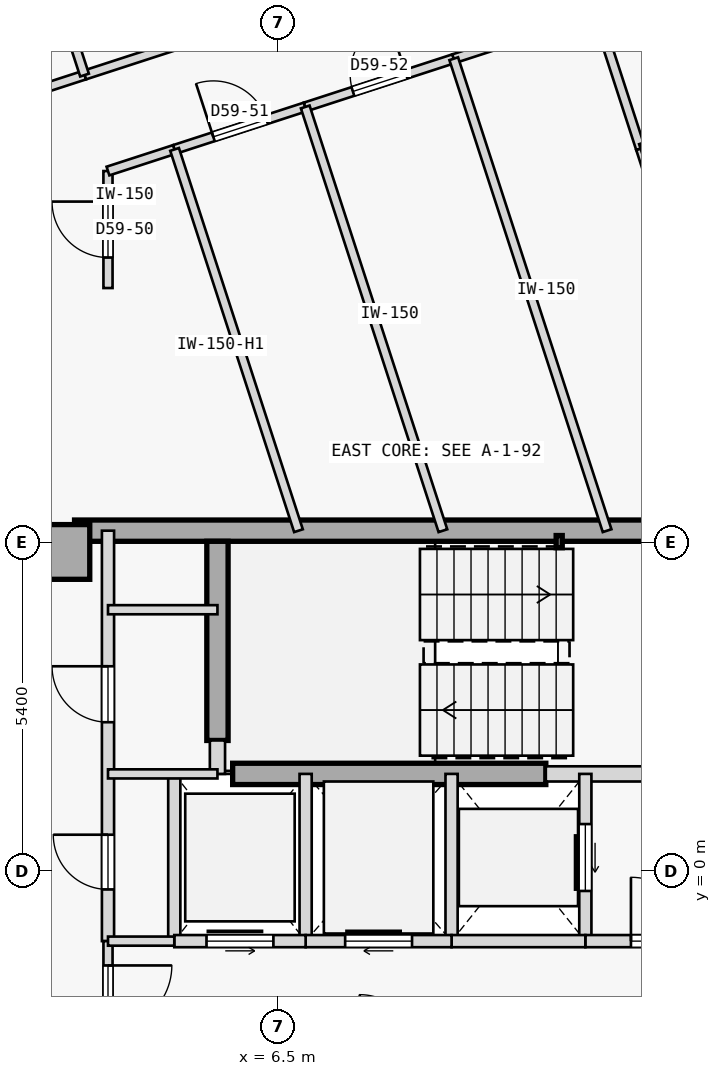
"""IFC4 building model, lengths in metres.
Left out: names, types, materials, properties, quantities, classifications, styles, units other than length and angle.
Written with IfcOpenShell. Run it as: python <this file> out.ifc"""

import sys

from ifc_helpers import new_model, si_unit, direction, frame, frame_2d, origin, origin_2d, place, context, subcontext, project, spatial, rectangle, hollow_rectangle, extrude, element, fill, save


model = new_model("IFC4")
c1 = context("Model", 3, precision=1e-05, world=origin(), true_north=direction((0.0, 1.0)))
c2 = subcontext(c1, "Body", "Model", "MODEL_VIEW")
j1 = project(units=[si_unit("LENGTHUNIT", "METRE"), si_unit("PLANEANGLEUNIT", "RADIAN")], contexts=[c1])
p1 = place(None, origin())
s1 = spatial("IfcSite", under=j1, at=p1, CompositionType="ELEMENT")
p2 = place(p1, origin())
s2 = spatial("IfcBuilding", under=s1, at=p2, CompositionType="ELEMENT")
p3 = place(p2, frame((0.0, 0.0, 224.3)))
s3 = spatial("IfcBuildingStorey", under=s2, at=p3, CompositionType="ELEMENT", Elevation=224.3)
p4 = place(p3, frame((2.95, 5.25, 0.0), z_axis=(0.0, 0.0, 1.0), x_axis=(1.0, 0.0, 0.0)))
e1 = element("IfcColumn", 1, at=p4, inside=s3, PredefinedType="COLUMN", context=c2, shape_type="SweptSolid", body=[
    extrude(rectangle(XDim=0.9, YDim=0.9, at=origin_2d()), origin(), (0.0, 0.0, 1.0), 3.35),
])
p5 = place(p3, frame((3.15, 5.6, 0.0), z_axis=(0.0, 0.0, 1.0), x_axis=(1.0, 0.0, 0.0)))
e2 = element("IfcWall", 2, at=p5, inside=s3, PredefinedType="SHEAR", context=c2, shape_type="SweptSolid", body=[
    extrude(rectangle(XDim=11.41, YDim=0.35, at=frame_2d((5.705, 0.0))), origin(), (0.0, 0.0, 1.0), 3.125),
])
p6 = place(p3, frame((5.5, 2.15, 0.0), z_axis=(0.0, 0.0, 1.0), x_axis=(0.0, 1.0, 0.0)))
e3 = element("IfcWall", 3, at=p6, inside=s3, PredefinedType="SHEAR", context=c2, shape_type="SweptSolid", body=[
    extrude(rectangle(XDim=3.275, YDim=0.35, at=frame_2d((1.638, 0.0))), origin(), (0.0, 0.0, 1.0), 3.125),
])
p7 = place(p3, frame((5.75, 1.6, 0.0), z_axis=(0.0, 0.0, 1.0), x_axis=(1.0, 0.0, 0.0)))
e4 = element("IfcWall", 4, at=p7, inside=s3, PredefinedType="SHEAR", context=c2, shape_type="SweptSolid", body=[
    extrude(rectangle(XDim=5.15, YDim=0.35, at=frame_2d((2.575, 0.0))), origin(), (0.0, 0.0, 1.0), 3.125),
])
p8 = place(p3, frame((11.12, 5.42, 0.0), z_axis=(0.0, 0.0, 1.0), x_axis=(1.0, 0.0, 0.0)))
e5 = element("IfcColumn", 5, at=p8, inside=s3, PredefinedType="COLUMN", context=c2, shape_type="SweptSolid", body=[
    extrude(hollow_rectangle(XDim=0.1, YDim=0.2, WallThickness=0.008, at=origin_2d()), origin(), (0.0, 0.0, 1.0), 3.35),
])
p9 = place(p3, frame((10.9, 1.6, 0.0), z_axis=(0.0, 0.0, 1.0), x_axis=(1.0, 0.0, 0.0)))
e6 = element("IfcWall", 6, at=p9, inside=s3, PredefinedType="STANDARD", context=c2, shape_type="SweptSolid", body=[
    extrude(rectangle(XDim=3.6, YDim=0.25, at=frame_2d((1.8, 0.0))), origin(), (0.0, 0.0, 1.0), 3.125),
])
p10 = place(p9, frame((1.62, 0.0, 0.0)))
e7 = element("IfcOpeningElement", 7, at=p10, cuts=e6, PredefinedType="OPENING", context=c2, shape_type="SweptSolid", body=[
    extrude(rectangle(XDim=1.05, YDim=2.15, at=frame_2d((0.525, 1.075))), frame((0.0, 0.135, 0.0), z_axis=(0.0, -1.0, 0.0), x_axis=(1.0, 0.0, 0.0)), (0.0, 0.0, 1.0), 0.27),
])
p11 = place(p3, frame((5.5, 1.6, 0.0), z_axis=(0.0, 0.0, 1.0), x_axis=(0.0, 1.0, 0.0)))
e8 = element("IfcWall", 8, at=p11, inside=s3, PredefinedType="STANDARD", context=c2, shape_type="SweptSolid", body=[
    extrude(rectangle(XDim=0.55, YDim=0.25, at=frame_2d((0.275, 0.0))), origin(), (0.0, 0.0, 1.0), 3.125),
])
p12 = place(p3, frame((3.7, -1.15, 0.0), z_axis=(0.0, 0.0, 1.0), x_axis=(0.0, 1.0, 0.0)))
e9 = element("IfcWall", 9, at=p12, inside=s3, PredefinedType="STANDARD", context=c2, shape_type="SweptSolid", body=[
    extrude(rectangle(XDim=6.75, YDim=0.2, at=frame_2d((3.375, 0.0))), origin(), (0.0, 0.0, 1.0), 3.125),
])
p13 = place(p12, frame((3.6, 0.0, 0.0)))
e10 = element("IfcOpeningElement", 10, at=p13, cuts=e9, PredefinedType="OPENING", context=c2, shape_type="SweptSolid", body=[
    extrude(rectangle(XDim=0.92, YDim=2.15, at=frame_2d((0.46, 1.075))), frame((0.0, 0.11, 0.0), z_axis=(0.0, -1.0, 0.0), x_axis=(1.0, 0.0, 0.0)), (0.0, 0.0, 1.0), 0.22),
])
p14 = place(p12, frame((0.85, 0.0, 0.0)))
e11 = element("IfcOpeningElement", 11, at=p14, cuts=e9, PredefinedType="OPENING", context=c2, shape_type="SweptSolid", body=[
    extrude(rectangle(XDim=0.9, YDim=2.15, at=frame_2d((0.45, 1.075))), frame((0.0, 0.11, 0.0), z_axis=(0.0, -1.0, 0.0), x_axis=(1.0, 0.0, 0.0)), (0.0, 0.0, 1.0), 0.22),
])
p15 = place(p3, frame((3.7, -2.95, 0.0), z_axis=(0.0, 0.0, 1.0), x_axis=(0.0, 1.0, 0.0)))
e12 = element("IfcWall", 12, at=p15, inside=s3, PredefinedType="PARTITIONING", context=c2, shape_type="SweptSolid", body=[
    extrude(rectangle(XDim=1.8, YDim=0.15, at=frame_2d((0.9, 0.0))), origin(), (0.0, 0.0, 1.0), 3.125),
])
p16 = place(p15, frame((0.35, 0.0, 0.0)))
e13 = element("IfcOpeningElement", 13, at=p16, cuts=e12, PredefinedType="OPENING", context=c2, shape_type="SweptSolid", body=[
    extrude(rectangle(XDim=1.05, YDim=2.18, at=frame_2d((0.525, 1.09))), frame((0.0, 0.085, 0.0), z_axis=(0.0, -1.0, 0.0), x_axis=(1.0, 0.0, 0.0)), (0.0, 0.0, 1.0), 0.17),
])
p17 = place(p3, frame((11.55, -1.15, 0.0), z_axis=(0.0, 0.0, 1.0), x_axis=(0.0, 1.0, 0.0)))
e14 = element("IfcWall", 14, at=p17, inside=s3, PredefinedType="STANDARD", context=c2, shape_type="SweptSolid", body=[
    extrude(rectangle(XDim=2.75, YDim=0.2, at=frame_2d((1.375, 0.0))), origin(), (0.0, 0.0, 1.0), 3.125),
])
p18 = place(p17, frame((0.825, 0.0, 0.0)))
e15 = element("IfcOpeningElement", 15, at=p18, cuts=e14, PredefinedType="OPENING", context=c2, shape_type="SweptSolid", body=[
    extrude(rectangle(XDim=1.1, YDim=2.15, at=frame_2d((0.55, 1.075))), frame((0.0, 0.11, 0.0), z_axis=(0.0, -1.0, 0.0), x_axis=(1.0, 0.0, 0.0)), (0.0, 0.0, 1.0), 0.22),
])
p19 = place(p3, frame((9.35, -1.15, 0.0), z_axis=(0.0, 0.0, 1.0), x_axis=(0.0, 1.0, 0.0)))
e16 = element("IfcWall", 16, at=p19, inside=s3, PredefinedType="STANDARD", context=c2, shape_type="SweptSolid", body=[
    extrude(rectangle(XDim=2.75, YDim=0.2, at=frame_2d((1.375, 0.0))), origin(), (0.0, 0.0, 1.0), 3.125),
])
p20 = place(p3, frame((11.55, -1.15, 0.0), z_axis=(0.0, 0.0, 1.0), x_axis=(1.0, 0.0, 0.0)))
e17 = element("IfcWall", 17, at=p20, inside=s3, PredefinedType="STANDARD", context=c2, shape_type="SweptSolid", body=[
    extrude(rectangle(XDim=2.95, YDim=0.2, at=frame_2d((1.475, 0.0))), origin(), (0.0, 0.0, 1.0), 3.125),
])
p21 = place(p20, frame((0.75, 0.0, 0.0)))
e18 = element("IfcOpeningElement", 18, at=p21, cuts=e17, PredefinedType="OPENING", context=c2, shape_type="SweptSolid", body=[
    extrude(rectangle(XDim=1.05, YDim=2.18, at=frame_2d((0.525, 1.09))), frame((0.0, 0.11, 0.0), z_axis=(0.0, -1.0, 0.0), x_axis=(1.0, 0.0, 0.0)), (0.0, 0.0, 1.0), 0.22),
])
p22 = place(p3, frame((9.35, -1.15, 0.0), z_axis=(0.0, 0.0, 1.0), x_axis=(1.0, 0.0, 0.0)))
e19 = element("IfcWall", 19, at=p22, inside=s3, PredefinedType="STANDARD", context=c2, shape_type="SweptSolid", body=[
    extrude(rectangle(XDim=2.2, YDim=0.2, at=frame_2d((1.1, 0.0))), origin(), (0.0, 0.0, 1.0), 3.125),
])
p23 = place(p3, frame((6.95, -1.15, 0.0), z_axis=(0.0, 0.0, 1.0), x_axis=(0.0, 1.0, 0.0)))
e20 = element("IfcWall", 20, at=p23, inside=s3, PredefinedType="STANDARD", context=c2, shape_type="SweptSolid", body=[
    extrude(rectangle(XDim=2.75, YDim=0.2, at=frame_2d((1.375, 0.0))), origin(), (0.0, 0.0, 1.0), 3.125),
])
p24 = place(p3, frame((6.95, -1.15, 0.0), z_axis=(0.0, 0.0, 1.0), x_axis=(1.0, 0.0, 0.0)))
e21 = element("IfcWall", 21, at=p24, inside=s3, PredefinedType="STANDARD", context=c2, shape_type="SweptSolid", body=[
    extrude(rectangle(XDim=2.4, YDim=0.2, at=frame_2d((1.2, 0.0))), origin(), (0.0, 0.0, 1.0), 3.125),
])
p25 = place(p24, frame((0.65, 0.0, 0.0)))
e22 = element("IfcOpeningElement", 22, at=p25, cuts=e21, PredefinedType="OPENING", context=c2, shape_type="SweptSolid", body=[
    extrude(rectangle(XDim=1.1, YDim=2.15, at=frame_2d((0.55, 1.075))), frame((0.0, 0.11, 0.0), z_axis=(0.0, -1.0, 0.0), x_axis=(1.0, 0.0, 0.0)), (0.0, 0.0, 1.0), 0.22),
])
p26 = place(p3, frame((4.79, -1.15, 0.0), z_axis=(0.0, 0.0, 1.0), x_axis=(0.0, 1.0, 0.0)))
e23 = element("IfcWall", 23, at=p26, inside=s3, PredefinedType="STANDARD", context=c2, shape_type="SweptSolid", body=[
    extrude(rectangle(XDim=2.75, YDim=0.2, at=frame_2d((1.375, 0.0))), origin(), (0.0, 0.0, 1.0), 3.125),
])
p27 = place(p3, frame((4.79, -1.15, 0.0), z_axis=(0.0, 0.0, 1.0), x_axis=(1.0, 0.0, 0.0)))
e24 = element("IfcWall", 24, at=p27, inside=s3, PredefinedType="STANDARD", context=c2, shape_type="SweptSolid", body=[
    extrude(rectangle(XDim=2.16, YDim=0.2, at=frame_2d((1.08, 0.0))), origin(), (0.0, 0.0, 1.0), 3.125),
])
p28 = place(p27, frame((0.53, 0.0, 0.0)))
e25 = element("IfcOpeningElement", 25, at=p28, cuts=e24, PredefinedType="OPENING", context=c2, shape_type="SweptSolid", body=[
    extrude(rectangle(XDim=1.1, YDim=2.15, at=frame_2d((0.55, 1.075))), frame((0.0, 0.11, 0.0), z_axis=(0.0, -1.0, 0.0), x_axis=(1.0, 0.0, 0.0)), (0.0, 0.0, 1.0), 0.22),
])
p29 = place(p3, frame((3.7, -1.15, 0.0), z_axis=(0.0, 0.0, 1.0), x_axis=(1.0, 0.0, 0.0)))
e26 = element("IfcWall", 26, at=p29, inside=s3, PredefinedType="PARTITIONING", context=c2, shape_type="SweptSolid", body=[
    extrude(rectangle(XDim=1.09, YDim=0.15, at=frame_2d((0.545, 0.0))), origin(), (0.0, 0.0, 1.0), 3.125),
])
for number, where, z_axis, x_axis in (
    (27, (3.7, 4.3, 0.0), (0.0, 0.0, 1.0), (1.0, 0.0, 0.0)),
    (28, (3.7, 1.6, 0.0), (0.0, 0.0, 1.0), (1.0, 0.0, 0.0)),
):
    element("IfcWall", number, at=place(p3, frame(where, z_axis=z_axis, x_axis=x_axis)), inside=s3, PredefinedType="PARTITIONING", context=c2, shape_type="SweptSolid", body=[
        extrude(rectangle(XDim=1.8, YDim=0.15, at=frame_2d((0.9, 0.0))), origin(), (0.0, 0.0, 1.0), 3.125),
    ])
p30 = place(p3, frame((3.314, 13.092, 0.0), z_axis=(0.0, 0.0, 1.0), x_axis=(0.951068976929, 0.308978641858, 0.0)))
e29 = element("IfcWall", 29, at=p30, inside=s3, PredefinedType="PARTITIONING", context=c2, shape_type="SweptSolid", body=[
    extrude(rectangle(XDim=4.522, YDim=0.15, at=frame_2d((2.261, 0.0))), origin(), (0.0, 0.0, 1.0), 3.125),
])
p31 = place(p30, frame((1.786, 0.0, 0.0)))
e30 = element("IfcOpeningElement", 30, at=p31, cuts=e29, PredefinedType="OPENING", context=c2, shape_type="SweptSolid", body=[
    extrude(rectangle(XDim=0.95, YDim=2.15, at=frame_2d((0.475, 1.075))), frame((0.0, 0.085, 0.0), z_axis=(0.0, -1.0, 0.0), x_axis=(1.0, 0.0, 0.0)), (0.0, 0.0, 1.0), 0.17),
])
p32 = place(p3, frame((-0.823, 11.748, 0.0), z_axis=(0.0, 0.0, 1.0), x_axis=(0.951052627573, 0.309028962374, 0.0)))
e31 = element("IfcWall", 31, at=p32, inside=s3, PredefinedType="PARTITIONING", context=c2, shape_type="SweptSolid", body=[
    extrude(rectangle(XDim=4.35, YDim=0.15, at=frame_2d((2.175, 0.0))), origin(), (0.0, 0.0, 1.0), 3.125),
])
p33 = place(p3, frame((3.7, 9.59, 0.0), z_axis=(0.0, 0.0, 1.0), x_axis=(-0.000380662325, 0.999999927548, 0.0)))
e32 = element("IfcWall", 32, at=p33, inside=s3, PredefinedType="PARTITIONING", context=c2, shape_type="SweptSolid", body=[
    extrude(rectangle(XDim=1.924, YDim=0.15, at=frame_2d((0.962, 0.0))), origin(), (0.0, 0.0, 1.0), 3.125),
])
p34 = place(p33, frame((0.502, 0.0, 0.0)))
e33 = element("IfcOpeningElement", 33, at=p34, cuts=e32, PredefinedType="OPENING", context=c2, shape_type="SweptSolid", body=[
    extrude(rectangle(XDim=0.92, YDim=2.15, at=frame_2d((0.46, 1.075))), frame((0.0, 0.085, 0.0), z_axis=(0.0, -1.0, 0.0), x_axis=(1.0, 0.0, 0.0)), (0.0, 0.0, 1.0), 0.17),
])
p35 = place(p3, frame((3.699, 11.514, 0.0), z_axis=(0.0, 0.0, 1.0), x_axis=(0.951071437281, 0.308971068529, 0.0)))
e34 = element("IfcWall", 34, at=p35, inside=s3, PredefinedType="PARTITIONING", context=c2, shape_type="SweptSolid", body=[
    extrude(rectangle(XDim=1.152, YDim=0.15, at=frame_2d((0.576, 0.0))), origin(), (0.0, 0.0, 1.0), 3.125),
])
p36 = place(p3, frame((4.795, 11.87, 0.0), z_axis=(0.0, 0.0, 1.0), x_axis=(0.951065832698, 0.308988319964, 0.0)))
e35 = element("IfcWall", 35, at=p36, inside=s3, PredefinedType="PARTITIONING", context=c2, shape_type="SweptSolid", body=[
    extrude(rectangle(XDim=2.259, YDim=0.15, at=frame_2d((1.129, 0.0))), origin(), (0.0, 0.0, 1.0), 3.125),
])
p37 = place(p36, frame((0.669, 0.0, 0.0)))
e36 = element("IfcOpeningElement", 36, at=p37, cuts=e35, PredefinedType="OPENING", context=c2, shape_type="SweptSolid", body=[
    extrude(rectangle(XDim=0.92, YDim=2.15, at=frame_2d((0.46, 1.075))), frame((0.0, 0.085, 0.0), z_axis=(0.0, -1.0, 0.0), x_axis=(1.0, 0.0, 0.0)), (0.0, 0.0, 1.0), 0.17),
])
p38 = place(p3, frame((6.944, 12.568, 0.0), z_axis=(0.0, 0.0, 1.0), x_axis=(0.951042451835, 0.309060276981, 0.0)))
e37 = element("IfcWall", 37, at=p38, inside=s3, PredefinedType="PARTITIONING", context=c2, shape_type="SweptSolid", body=[
    extrude(rectangle(XDim=2.568, YDim=0.15, at=frame_2d((1.284, 0.0))), origin(), (0.0, 0.0, 1.0), 3.125),
])
p39 = place(p38, frame((0.824, 0.0, 0.0)))
e38 = element("IfcOpeningElement", 38, at=p39, cuts=e37, PredefinedType="OPENING", context=c2, shape_type="SweptSolid", body=[
    extrude(rectangle(XDim=0.92, YDim=2.15, at=frame_2d((0.46, 1.075))), frame((0.0, 0.085, 0.0), z_axis=(0.0, -1.0, 0.0), x_axis=(1.0, 0.0, 0.0)), (0.0, 0.0, 1.0), 0.17),
])
p40 = place(p3, frame((9.386, 13.362, 0.0), z_axis=(0.0, 0.0, 1.0), x_axis=(0.951052991774, 0.309027841526, 0.0)))
e39 = element("IfcWall", 39, at=p40, inside=s3, PredefinedType="PARTITIONING", context=c2, shape_type="SweptSolid", body=[
    extrude(rectangle(XDim=2.465, YDim=0.15, at=frame_2d((1.232, 0.0))), origin(), (0.0, 0.0, 1.0), 3.125),
])
p41 = place(p40, frame((0.772, 0.0, 0.0)))
e40 = element("IfcOpeningElement", 40, at=p41, cuts=e39, PredefinedType="OPENING", context=c2, shape_type="SweptSolid", body=[
    extrude(rectangle(XDim=0.92, YDim=2.15, at=frame_2d((0.46, 1.075))), frame((0.0, 0.085, 0.0), z_axis=(0.0, -1.0, 0.0), x_axis=(1.0, 0.0, 0.0)), (0.0, 0.0, 1.0), 0.17),
])
p42 = place(p3, frame((3.314, 13.092, 0.0), z_axis=(0.0, 0.0, 1.0), x_axis=(-0.309058537449, 0.951043017129, 0.0)))
e41 = element("IfcWall", 41, at=p42, inside=s3, PredefinedType="PARTITIONING", context=c2, shape_type="SweptSolid", body=[
    extrude(rectangle(XDim=2.005, YDim=0.15, at=frame_2d((1.002, 0.0))), origin(), (0.0, 0.0, 1.0), 3.125),
])
p43 = place(p42, frame((0.552, 0.0, 0.0)))
e42 = element("IfcOpeningElement", 42, at=p43, cuts=e41, PredefinedType="OPENING", context=c2, shape_type="SweptSolid", body=[
    extrude(rectangle(XDim=0.9, YDim=2.15, at=frame_2d((0.45, 1.075))), frame((0.0, 0.085, 0.0), z_axis=(0.0, -1.0, 0.0), x_axis=(1.0, 0.0, 0.0)), (0.0, 0.0, 1.0), 0.17),
])
p44 = place(p3, frame((6.833, 5.6, 0.0), z_axis=(0.0, 0.0, 1.0), x_axis=(-0.309019923183, 0.951055564663, 0.0)))
e43 = element("IfcWall", 43, at=p44, inside=s3, PredefinedType="PARTITIONING", context=c2, shape_type="SweptSolid", body=[
    extrude(rectangle(XDim=6.593, YDim=0.15, at=frame_2d((3.296, 0.0))), origin(), (0.0, 0.0, 1.0), 2.675),
])
p45 = place(p3, frame((9.208, 5.6, 0.0), z_axis=(0.0, 0.0, 1.0), x_axis=(-0.309021275068, 0.951055125403, 0.0)))
e44 = element("IfcWall", 44, at=p45, inside=s3, PredefinedType="PARTITIONING", context=c2, shape_type="SweptSolid", body=[
    extrude(rectangle(XDim=7.327, YDim=0.15, at=frame_2d((3.664, 0.0))), origin(), (0.0, 0.0, 1.0), 3.125),
])
p46 = place(p3, frame((11.908, 5.6, 0.0), z_axis=(0.0, 0.0, 1.0), x_axis=(-0.308994076163, 0.951063962568, 0.0)))
e45 = element("IfcWall", 45, at=p46, inside=s3, PredefinedType="PARTITIONING", context=c2, shape_type="SweptSolid", body=[
    extrude(rectangle(XDim=8.161, YDim=0.15, at=frame_2d((4.081, 0.0))), origin(), (0.0, 0.0, 1.0), 3.125),
])
p47 = place(p3, frame((13.488, 8.714, 0.0), z_axis=(0.0, 0.0, 1.0), x_axis=(-0.308946982245, 0.951079261766, 0.0)))
e46 = element("IfcWall", 46, at=p47, inside=s3, PredefinedType="PARTITIONING", context=c2, shape_type="SweptSolid", body=[
    extrude(rectangle(XDim=3.334, YDim=0.15, at=frame_2d((1.667, 0.0))), origin(), (0.0, 0.0, 1.0), 3.125),
])
p48 = place(p3, frame((12.458, 11.885, 0.0), z_axis=(0.0, 0.0, 1.0), x_axis=(-0.309062621189, 0.951041690035, 0.0)))
e47 = element("IfcWall", 47, at=p48, inside=s3, PredefinedType="PARTITIONING", context=c2, shape_type="SweptSolid", body=[
    extrude(rectangle(XDim=2.354, YDim=0.15, at=frame_2d((1.177, 0.0))), origin(), (0.0, 0.0, 1.0), 3.125),
])
p49 = place(p3, frame((12.458, 11.885, 0.0), z_axis=(0.0, 0.0, 1.0), x_axis=(0.951060263663, 0.309005460926, 0.0)))
e48 = element("IfcWall", 48, at=p49, inside=s3, PredefinedType="PARTITIONING", context=c2, shape_type="SweptSolid", body=[
    extrude(rectangle(XDim=12.327, YDim=0.15, at=frame_2d((6.164, 0.0))), origin(), (0.0, 0.0, 1.0), 3.125),
])
p50 = place(p21, origin())
e49 = element("IfcDoor", 49, at=p50, inside=s3, OperationType="SINGLE_SWING_LEFT", PredefinedType="DOOR", context=c2, shape_type="SweptSolid", body=[
    extrude(rectangle(XDim=1.05, YDim=2.18, at=frame_2d((0.525, 1.09))), frame((0.0, 0.025, 0.0), z_axis=(0.0, -1.0, 0.0), x_axis=(1.0, 0.0, 0.0)), (0.0, 0.0, 1.0), 0.05),
])
fill(e18, e49)
p51 = place(p16, frame((1.05, 0.0, 0.0), z_axis=(0.0, 0.0, 1.0), x_axis=(-1.0, 0.0, 0.0)))
e50 = element("IfcDoor", 50, at=p51, inside=s3, OperationType="SINGLE_SWING_RIGHT", PredefinedType="DOOR", context=c2, shape_type="SweptSolid", body=[
    extrude(rectangle(XDim=1.05, YDim=2.18, at=frame_2d((0.525, 1.09))), frame((0.0, 0.025, 0.0), z_axis=(0.0, -1.0, 0.0), x_axis=(1.0, 0.0, 0.0)), (0.0, 0.0, 1.0), 0.05),
])
fill(e13, e50)
p52 = place(p18, origin())
e51 = element("IfcDoor", 51, at=p52, inside=s3, OperationType="SLIDING_TO_RIGHT", PredefinedType="DOOR", context=c2, shape_type="SweptSolid", body=[
    extrude(rectangle(XDim=1.1, YDim=2.15, at=frame_2d((0.55, 1.075))), frame((0.0, 0.025, 0.0), z_axis=(0.0, -1.0, 0.0), x_axis=(1.0, 0.0, 0.0)), (0.0, 0.0, 1.0), 0.05),
])
fill(e15, e51)
p53 = place(p25, origin())
e52 = element("IfcDoor", 52, at=p53, inside=s3, OperationType="SLIDING_TO_RIGHT", PredefinedType="DOOR", context=c2, shape_type="SweptSolid", body=[
    extrude(rectangle(XDim=1.1, YDim=2.15, at=frame_2d((0.55, 1.075))), frame((0.0, 0.025, 0.0), z_axis=(0.0, -1.0, 0.0), x_axis=(1.0, 0.0, 0.0)), (0.0, 0.0, 1.0), 0.05),
])
fill(e22, e52)
p54 = place(p28, origin())
e53 = element("IfcDoor", 53, at=p54, inside=s3, OperationType="SLIDING_TO_LEFT", PredefinedType="DOOR", context=c2, shape_type="SweptSolid", body=[
    extrude(rectangle(XDim=1.1, YDim=2.15, at=frame_2d((0.55, 1.075))), frame((0.0, 0.025, 0.0), z_axis=(0.0, -1.0, 0.0), x_axis=(1.0, 0.0, 0.0)), (0.0, 0.0, 1.0), 0.05),
])
fill(e25, e53)
p55 = place(p13, origin())
e54 = element("IfcDoor", 54, at=p55, inside=s3, OperationType="SINGLE_SWING_RIGHT", PredefinedType="DOOR", context=c2, shape_type="SweptSolid", body=[
    extrude(rectangle(XDim=0.92, YDim=2.15, at=frame_2d((0.46, 1.075))), frame((0.0, 0.025, 0.0), z_axis=(0.0, -1.0, 0.0), x_axis=(1.0, 0.0, 0.0)), (0.0, 0.0, 1.0), 0.05),
])
fill(e10, e54)
p56 = place(p14, origin())
e55 = element("IfcDoor", 55, at=p56, inside=s3, OperationType="SINGLE_SWING_RIGHT", PredefinedType="DOOR", context=c2, shape_type="SweptSolid", body=[
    extrude(rectangle(XDim=0.9, YDim=2.15, at=frame_2d((0.45, 1.075))), frame((0.0, 0.025, 0.0), z_axis=(0.0, -1.0, 0.0), x_axis=(1.0, 0.0, 0.0)), (0.0, 0.0, 1.0), 0.05),
])
fill(e11, e55)
p57 = place(p34, origin())
e56 = element("IfcDoor", 56, at=p57, inside=s3, OperationType="SINGLE_SWING_RIGHT", PredefinedType="DOOR", context=c2, shape_type="SweptSolid", body=[
    extrude(rectangle(XDim=0.92, YDim=2.15, at=frame_2d((0.46, 1.075))), frame((0.0, 0.025, 0.0), z_axis=(0.0, -1.0, 0.0), x_axis=(1.0, 0.0, 0.0)), (0.0, 0.0, 1.0), 0.05),
])
fill(e33, e56)
p58 = place(p37, origin())
e57 = element("IfcDoor", 57, at=p58, inside=s3, OperationType="SINGLE_SWING_LEFT", PredefinedType="DOOR", context=c2, shape_type="SweptSolid", body=[
    extrude(rectangle(XDim=0.92, YDim=2.15, at=frame_2d((0.46, 1.075))), frame((0.0, 0.025, 0.0), z_axis=(0.0, -1.0, 0.0), x_axis=(1.0, 0.0, 0.0)), (0.0, 0.0, 1.0), 0.05),
])
fill(e36, e57)
p59 = place(p39, origin())
e58 = element("IfcDoor", 58, at=p59, inside=s3, OperationType="SINGLE_SWING_RIGHT", PredefinedType="DOOR", context=c2, shape_type="SweptSolid", body=[
    extrude(rectangle(XDim=0.92, YDim=2.15, at=frame_2d((0.46, 1.075))), frame((0.0, 0.025, 0.0), z_axis=(0.0, -1.0, 0.0), x_axis=(1.0, 0.0, 0.0)), (0.0, 0.0, 1.0), 0.05),
])
fill(e38, e58)
save(model, sys.argv[1])
